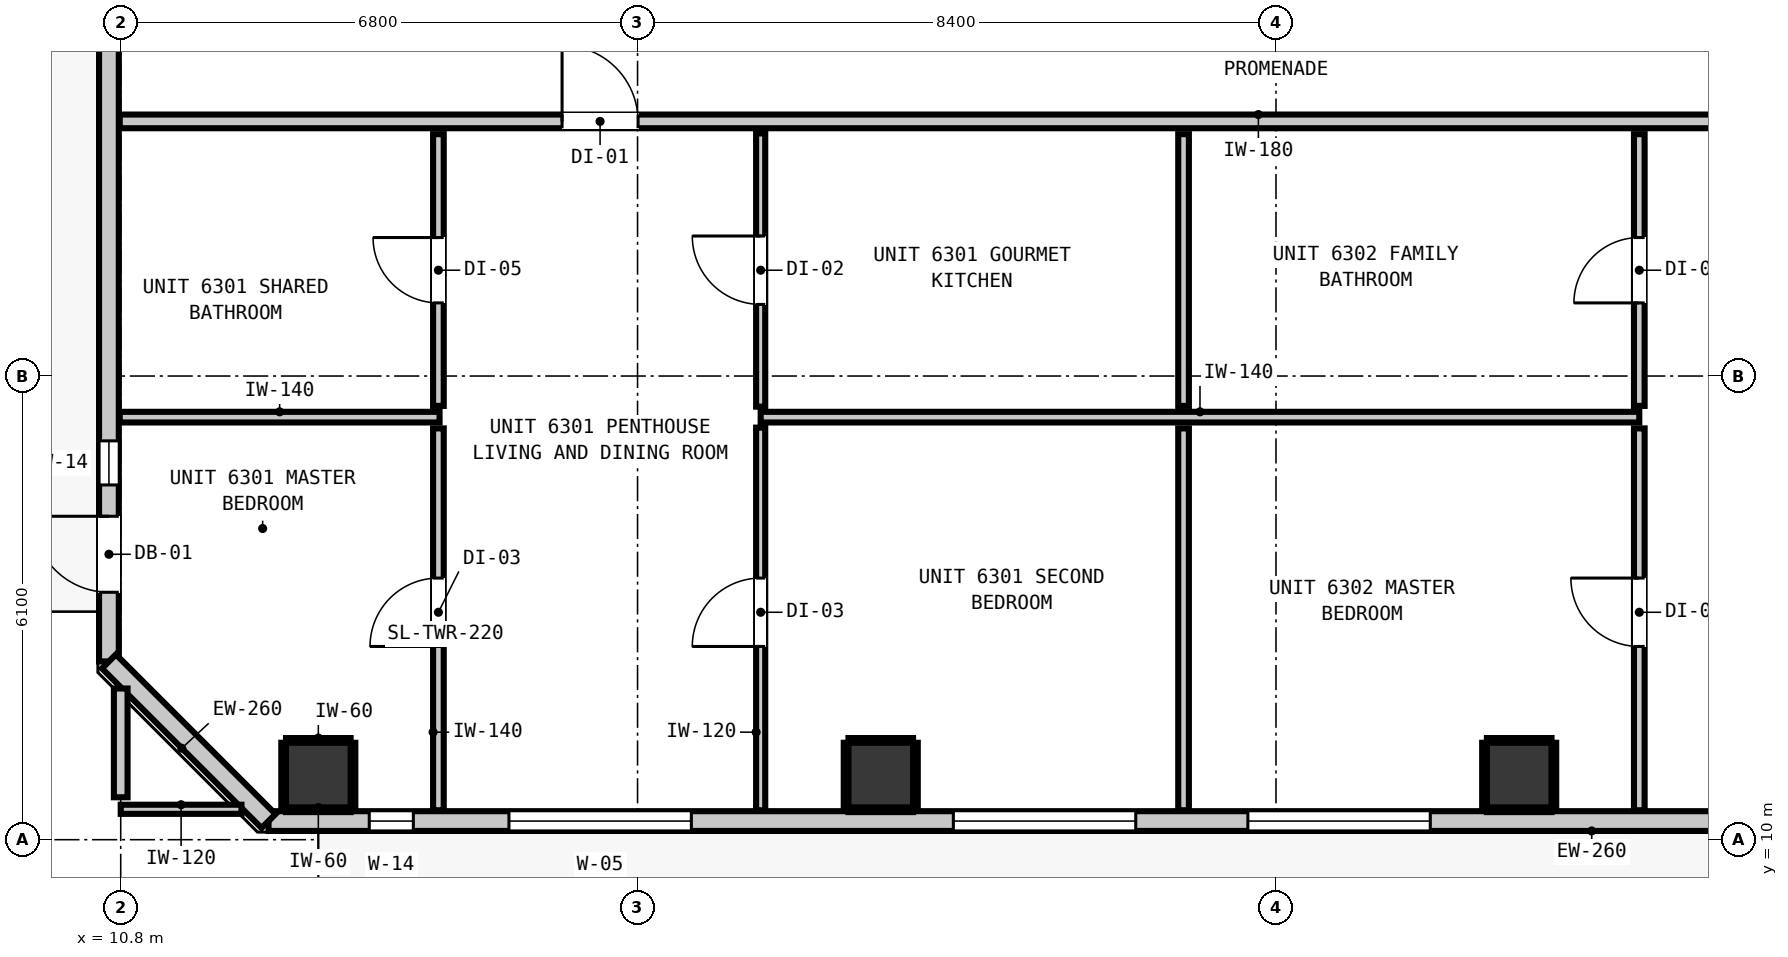
"""IFC4 building model, lengths in metres.
Left out: names, types, materials, properties, quantities, classifications, styles, units other than length and angle.
Written with IfcOpenShell. Run it as: python <this file> out.ifc"""

import sys

from ifc_helpers import new_model, si_unit, direction, frame, frame_2d, origin, origin_2d, place, context, subcontext, project, spatial, rectangle, extrude, element, fill, save


model = new_model("IFC4")
c1 = context("Model", 3, precision=1e-05, world=origin(), true_north=direction((0.0, 1.0)))
c2 = subcontext(c1, "Body", "Model", "MODEL_VIEW")
j1 = project(units=[si_unit("LENGTHUNIT", "METRE"), si_unit("PLANEANGLEUNIT", "RADIAN")], contexts=[c1])
p1 = place(None, origin())
s1 = spatial("IfcSite", under=j1, at=p1, CompositionType="ELEMENT")
p2 = place(p1, origin())
s2 = spatial("IfcBuilding", under=s1, at=p2, CompositionType="ELEMENT")
p3 = place(p2, frame((0.0, 0.0, 216.72)))
s3 = spatial("IfcBuildingStorey", under=s2, at=p3, CompositionType="ELEMENT", Elevation=216.72)
for number, where, z_axis, x_axis in (
    (1, (13.4, 10.85, 0.0), (0.0, 0.0, 1.0), (1.0, 0.0, 0.0)),
    (2, (20.8, 10.85, 0.0), (0.0, 0.0, 1.0), (1.0, 0.0, 0.0)),
    (3, (29.2, 10.85, 0.0), (0.0, 0.0, 1.0), (1.0, 0.0, 0.0)),
):
    element("IfcColumn", number, at=place(p3, frame(where, z_axis=z_axis, x_axis=x_axis)), inside=s3, PredefinedType="COLUMN", context=c2, shape_type="SweptSolid", body=[
        extrude(rectangle(XDim=0.85, YDim=0.85, at=origin_2d()), origin(), (0.0, 0.0, 1.0), 3.32),
    ])
p4 = place(p3, frame((10.645, 12.345, 0.0), z_axis=(0.0, 0.0, 1.0), x_axis=(0.0, 1.0, 0.0)))
e4 = element("IfcWall", 4, at=p4, inside=s3, PredefinedType="STANDARD", context=c2, shape_type="SweptSolid", body=[
    extrude(rectangle(XDim=30.31, YDim=0.26, at=frame_2d((15.155, 0.0))), origin(), (0.0, 0.0, 1.0), 3.1),
])
p5 = place(p4, frame((0.91, 0.0, 0.0)))
e5 = element("IfcOpeningElement", 5, at=p5, cuts=e4, PredefinedType="OPENING", context=c2, shape_type="SweptSolid", body=[
    extrude(rectangle(XDim=1.0, YDim=2.15, at=frame_2d((0.5, 1.075))), frame((0.0, 0.14, 0.0), z_axis=(0.0, -1.0, 0.0), x_axis=(1.0, 0.0, 0.0)), (0.0, 0.0, 1.0), 0.28),
])
p6 = place(p4, frame((2.322, 0.0, 0.85)))
e6 = element("IfcOpeningElement", 6, at=p6, cuts=e4, PredefinedType="OPENING", context=c2, shape_type="SweptSolid", body=[
    extrude(rectangle(XDim=0.58, YDim=1.5, at=frame_2d((0.29, 0.75))), frame((0.0, 0.14, 0.0), z_axis=(0.0, -1.0, 0.0), x_axis=(1.0, 0.0, 0.0)), (0.0, 0.0, 1.0), 0.28),
])
p7 = place(p3, frame((45.455, 10.245, 0.0), z_axis=(0.0, 0.0, 1.0), x_axis=(-1.0, 0.0, 0.0)))
e7 = element("IfcWall", 7, at=p7, inside=s3, PredefinedType="STANDARD", context=c2, shape_type="SweptSolid", body=[
    extrude(rectangle(XDim=32.71, YDim=0.26, at=frame_2d((16.355, 0.0))), origin(), (0.0, 0.0, 1.0), 3.1),
])
p8 = place(p7, frame((2.665, 0.0, 0.0)))
e8 = element("IfcOpeningElement", 8, at=p8, cuts=e7, PredefinedType="OPENING", context=c2, shape_type="SweptSolid", body=[
    extrude(rectangle(XDim=1.0, YDim=2.15, at=frame_2d((0.5, 1.075))), frame((0.0, 0.14, 0.0), z_axis=(0.0, -1.0, 0.0), x_axis=(1.0, 0.0, 0.0)), (0.0, 0.0, 1.0), 0.28),
])
p9 = place(p7, frame((27.147, 0.0, 0.85)))
e9 = element("IfcOpeningElement", 9, at=p9, cuts=e7, PredefinedType="OPENING", context=c2, shape_type="SweptSolid", body=[
    extrude(rectangle(XDim=2.4, YDim=1.95, at=frame_2d((1.2, 0.975))), frame((0.0, 0.14, 0.0), z_axis=(0.0, -1.0, 0.0), x_axis=(1.0, 0.0, 0.0)), (0.0, 0.0, 1.0), 0.28),
])
p10 = place(p7, frame((30.805, 0.0, 0.85)))
e10 = element("IfcOpeningElement", 10, at=p10, cuts=e7, PredefinedType="OPENING", context=c2, shape_type="SweptSolid", body=[
    extrude(rectangle(XDim=0.58, YDim=1.5, at=frame_2d((0.29, 0.75))), frame((0.0, 0.14, 0.0), z_axis=(0.0, -1.0, 0.0), x_axis=(1.0, 0.0, 0.0)), (0.0, 0.0, 1.0), 0.28),
])
p11 = place(p7, frame((21.3, 0.0, 0.85)))
e11 = element("IfcOpeningElement", 11, at=p11, cuts=e7, PredefinedType="OPENING", context=c2, shape_type="SweptSolid", body=[
    extrude(rectangle(XDim=2.4, YDim=1.95, at=frame_2d((1.2, 0.975))), frame((0.0, 0.14, 0.0), z_axis=(0.0, -1.0, 0.0), x_axis=(1.0, 0.0, 0.0)), (0.0, 0.0, 1.0), 0.28),
])
p12 = place(p7, frame((10.777, 0.0, 0.85)))
e12 = element("IfcOpeningElement", 12, at=p12, cuts=e7, PredefinedType="OPENING", context=c2, shape_type="SweptSolid", body=[
    extrude(rectangle(XDim=2.4, YDim=1.95, at=frame_2d((1.2, 0.975))), frame((0.0, 0.14, 0.0), z_axis=(0.0, -1.0, 0.0), x_axis=(1.0, 0.0, 0.0)), (0.0, 0.0, 1.0), 0.28),
])
p13 = place(p7, frame((17.425, 0.0, 0.85)))
e13 = element("IfcOpeningElement", 13, at=p13, cuts=e7, PredefinedType="OPENING", context=c2, shape_type="SweptSolid", body=[
    extrude(rectangle(XDim=2.4, YDim=1.95, at=frame_2d((1.2, 0.975))), frame((0.0, 0.14, 0.0), z_axis=(0.0, -1.0, 0.0), x_axis=(1.0, 0.0, 0.0)), (0.0, 0.0, 1.0), 0.28),
])
p14 = place(p7, frame((4.37, 0.0, 0.85)))
e14 = element("IfcOpeningElement", 14, at=p14, cuts=e7, PredefinedType="OPENING", context=c2, shape_type="SweptSolid", body=[
    extrude(rectangle(XDim=2.4, YDim=1.95, at=frame_2d((1.2, 0.975))), frame((0.0, 0.14, 0.0), z_axis=(0.0, -1.0, 0.0), x_axis=(1.0, 0.0, 0.0)), (0.0, 0.0, 1.0), 0.28),
])
p15 = place(p7, frame((0.548, 0.0, 0.85)))
e15 = element("IfcOpeningElement", 15, at=p15, cuts=e7, PredefinedType="OPENING", context=c2, shape_type="SweptSolid", body=[
    extrude(rectangle(XDim=1.05, YDim=1.65, at=frame_2d((0.525, 0.825))), frame((0.0, 0.14, 0.0), z_axis=(0.0, -1.0, 0.0), x_axis=(1.0, 0.0, 0.0)), (0.0, 0.0, 1.0), 0.28),
])
p16 = place(p3, frame((12.745, 10.245, 0.0), z_axis=(0.0, 0.0, 1.0), x_axis=(-0.707147883682, 0.707065676302, 0.0)))
e16 = element("IfcWall", 16, at=p16, inside=s3, PredefinedType="STANDARD", context=c2, shape_type="SweptSolid", body=[
    extrude(rectangle(XDim=2.97, YDim=0.26, at=frame_2d((1.485, 0.0))), origin(), (0.0, 0.0, 1.0), 3.1),
])
p17 = place(p3, frame((10.787, 19.45, 0.0), z_axis=(0.0, 0.0, 1.0), x_axis=(1.0, 0.0, 0.0)))
e17 = element("IfcWall", 17, at=p17, inside=s3, PredefinedType="PARTITIONING", context=c2, shape_type="SweptSolid", body=[
    extrude(rectangle(XDim=36.626, YDim=0.18, at=frame_2d((18.313, 0.0))), origin(), (0.0, 0.0, 1.0), 3.1),
])
p18 = place(p17, frame((5.82, 0.0, 0.0)))
e18 = element("IfcOpeningElement", 18, at=p18, cuts=e17, PredefinedType="OPENING", context=c2, shape_type="SweptSolid", body=[
    extrude(rectangle(XDim=1.0, YDim=2.15, at=frame_2d((0.5, 1.075))), frame((0.0, 0.1, 0.0), z_axis=(0.0, -1.0, 0.0), x_axis=(1.0, 0.0, 0.0)), (0.0, 0.0, 1.0), 0.2),
])
p19 = place(p17, frame((23.143, 0.0, 0.0)))
e19 = element("IfcOpeningElement", 19, at=p19, cuts=e17, PredefinedType="OPENING", context=c2, shape_type="SweptSolid", body=[
    extrude(rectangle(XDim=1.0, YDim=2.15, at=frame_2d((0.5, 1.075))), frame((0.0, 0.1, 0.0), z_axis=(0.0, -1.0, 0.0), x_axis=(1.0, 0.0, 0.0)), (0.0, 0.0, 1.0), 0.2),
])
p20 = place(p3, frame((10.787, 15.559, 0.0), z_axis=(0.0, 0.0, 1.0), x_axis=(1.0, 0.0, 0.0)))
e20 = element("IfcWall", 20, at=p20, inside=s3, PredefinedType="PARTITIONING", context=c2, shape_type="SweptSolid", body=[
    extrude(rectangle(XDim=4.208, YDim=0.14, at=frame_2d((2.104, 0.0))), origin(), (0.0, 0.0, 1.0), 3.1),
])
p21 = place(p3, frame((19.22, 15.559, 0.0), z_axis=(0.0, 0.0, 1.0), x_axis=(1.0, 0.0, 0.0)))
e21 = element("IfcWall", 21, at=p21, inside=s3, PredefinedType="PARTITIONING", context=c2, shape_type="SweptSolid", body=[
    extrude(rectangle(XDim=11.56, YDim=0.14, at=frame_2d((5.78, 0.0))), origin(), (0.0, 0.0, 1.0), 3.1),
])
p22 = place(p3, frame((10.8, 10.4, 0.0), z_axis=(0.0, 0.0, 1.0), x_axis=(1.0, 0.0, 0.0)))
e22 = element("IfcWall", 22, at=p22, inside=s3, PredefinedType="PARTITIONING", context=c2, shape_type="SweptSolid", body=[
    extrude(rectangle(XDim=1.589, YDim=0.12, at=frame_2d((0.794, 0.0))), origin(), (0.0, 0.0, 1.0), 3.1),
])
p23 = place(p3, frame((10.8, 10.558, 0.0), z_axis=(0.0, 0.0, 1.0), x_axis=(0.0, 1.0, 0.0)))
e23 = element("IfcWall", 23, at=p23, inside=s3, PredefinedType="PARTITIONING", context=c2, shape_type="SweptSolid", body=[
    extrude(rectangle(XDim=1.431, YDim=0.18, at=frame_2d((0.715, 0.0))), origin(), (0.0, 0.0, 1.0), 3.1),
])
p24 = place(p3, frame((14.98, 10.387, 0.0), z_axis=(0.0, 0.0, 1.0), x_axis=(0.0, 1.0, 0.0)))
e24 = element("IfcWall", 24, at=p24, inside=s3, PredefinedType="PARTITIONING", context=c2, shape_type="SweptSolid", body=[
    extrude(rectangle(XDim=5.024, YDim=0.14, at=frame_2d((2.512, 0.0))), origin(), (0.0, 0.0, 1.0), 3.1),
])
p25 = place(p24, frame((2.155, 0.0, 0.0)))
e25 = element("IfcOpeningElement", 25, at=p25, cuts=e24, PredefinedType="OPENING", context=c2, shape_type="SweptSolid", body=[
    extrude(rectangle(XDim=0.9, YDim=2.1, at=frame_2d((0.45, 1.05))), frame((0.0, 0.08, 0.0), z_axis=(0.0, -1.0, 0.0), x_axis=(1.0, 0.0, 0.0)), (0.0, 0.0, 1.0), 0.16),
])
p26 = place(p3, frame((14.98, 15.707, 0.0), z_axis=(0.0, 0.0, 1.0), x_axis=(0.0, 1.0, 0.0)))
e26 = element("IfcWall", 26, at=p26, inside=s3, PredefinedType="PARTITIONING", context=c2, shape_type="SweptSolid", body=[
    extrude(rectangle(XDim=3.575, YDim=0.14, at=frame_2d((1.788, 0.0))), origin(), (0.0, 0.0, 1.0), 3.1),
])
p27 = place(p26, frame((1.355, 0.0, 0.0)))
e27 = element("IfcOpeningElement", 27, at=p27, cuts=e26, PredefinedType="OPENING", context=c2, shape_type="SweptSolid", body=[
    extrude(rectangle(XDim=0.86, YDim=2.02, at=frame_2d((0.43, 1.01))), frame((0.0, 0.08, 0.0), z_axis=(0.0, -1.0, 0.0), x_axis=(1.0, 0.0, 0.0)), (0.0, 0.0, 1.0), 0.16),
])
p28 = place(p3, frame((24.784, 10.387, 0.0), z_axis=(0.0, 0.0, 1.0), x_axis=(0.0, 1.0, 0.0)))
e28 = element("IfcWall", 28, at=p28, inside=s3, PredefinedType="PARTITIONING", context=c2, shape_type="SweptSolid", body=[
    extrude(rectangle(XDim=5.024, YDim=0.14, at=frame_2d((2.512, 0.0))), origin(), (0.0, 0.0, 1.0), 3.1),
])
p29 = place(p3, frame((24.784, 15.707, 0.0), z_axis=(0.0, 0.0, 1.0), x_axis=(0.0, 1.0, 0.0)))
e29 = element("IfcWall", 29, at=p29, inside=s3, PredefinedType="PARTITIONING", context=c2, shape_type="SweptSolid", body=[
    extrude(rectangle(XDim=3.575, YDim=0.14, at=frame_2d((1.788, 0.0))), origin(), (0.0, 0.0, 1.0), 3.1),
])
p30 = place(p3, frame((30.78, 10.387, 0.0), z_axis=(0.0, 0.0, 1.0), x_axis=(0.0, 1.0, 0.0)))
e30 = element("IfcWall", 30, at=p30, inside=s3, PredefinedType="PARTITIONING", context=c2, shape_type="SweptSolid", body=[
    extrude(rectangle(XDim=5.024, YDim=0.14, at=frame_2d((2.512, 0.0))), origin(), (0.0, 0.0, 1.0), 3.1),
])
p31 = place(p30, frame((2.155, 0.0, 0.0)))
e31 = element("IfcOpeningElement", 31, at=p31, cuts=e30, PredefinedType="OPENING", context=c2, shape_type="SweptSolid", body=[
    extrude(rectangle(XDim=0.9, YDim=2.1, at=frame_2d((0.45, 1.05))), frame((0.0, 0.08, 0.0), z_axis=(0.0, -1.0, 0.0), x_axis=(1.0, 0.0, 0.0)), (0.0, 0.0, 1.0), 0.16),
])
p32 = place(p3, frame((30.78, 15.707, 0.0), z_axis=(0.0, 0.0, 1.0), x_axis=(0.0, 1.0, 0.0)))
e32 = element("IfcWall", 32, at=p32, inside=s3, PredefinedType="PARTITIONING", context=c2, shape_type="SweptSolid", body=[
    extrude(rectangle(XDim=3.575, YDim=0.14, at=frame_2d((1.788, 0.0))), origin(), (0.0, 0.0, 1.0), 3.1),
])
p33 = place(p32, frame((1.355, 0.0, 0.0)))
e33 = element("IfcOpeningElement", 33, at=p33, cuts=e32, PredefinedType="OPENING", context=c2, shape_type="SweptSolid", body=[
    extrude(rectangle(XDim=0.86, YDim=2.02, at=frame_2d((0.43, 1.01))), frame((0.0, 0.08, 0.0), z_axis=(0.0, -1.0, 0.0), x_axis=(1.0, 0.0, 0.0)), (0.0, 0.0, 1.0), 0.16),
])
p34 = place(p3, frame((19.22, 10.387, 0.0), z_axis=(0.0, 0.0, 1.0), x_axis=(0.0, 1.0, 0.0)))
e34 = element("IfcWall", 34, at=p34, inside=s3, PredefinedType="PARTITIONING", context=c2, shape_type="SweptSolid", body=[
    extrude(rectangle(XDim=5.034, YDim=0.12, at=frame_2d((2.517, 0.0))), origin(), (0.0, 0.0, 1.0), 3.1),
])
p35 = place(p34, frame((2.155, 0.0, 0.0)))
e35 = element("IfcOpeningElement", 35, at=p35, cuts=e34, PredefinedType="OPENING", context=c2, shape_type="SweptSolid", body=[
    extrude(rectangle(XDim=0.9, YDim=2.1, at=frame_2d((0.45, 1.05))), frame((0.0, 0.07, 0.0), z_axis=(0.0, -1.0, 0.0), x_axis=(1.0, 0.0, 0.0)), (0.0, 0.0, 1.0), 0.14),
])
p36 = place(p3, frame((19.22, 15.697, 0.0), z_axis=(0.0, 0.0, 1.0), x_axis=(0.0, 1.0, 0.0)))
e36 = element("IfcWall", 36, at=p36, inside=s3, PredefinedType="PARTITIONING", context=c2, shape_type="SweptSolid", body=[
    extrude(rectangle(XDim=3.595, YDim=0.12, at=frame_2d((1.797, 0.0))), origin(), (0.0, 0.0, 1.0), 3.1),
])
p37 = place(p36, frame((1.345, 0.0, 0.0)))
e37 = element("IfcOpeningElement", 37, at=p37, cuts=e36, PredefinedType="OPENING", context=c2, shape_type="SweptSolid", body=[
    extrude(rectangle(XDim=0.9, YDim=2.1, at=frame_2d((0.45, 1.05))), frame((0.0, 0.07, 0.0), z_axis=(0.0, -1.0, 0.0), x_axis=(1.0, 0.0, 0.0)), (0.0, 0.0, 1.0), 0.14),
])
for number, where, z_axis, x_axis in (
    (38, (12.975, 10.393, 0.0), (0.0, 0.0, 1.0), (1.0, 0.0, 0.0)),
    (39, (12.975, 11.307, 0.0), (0.0, 0.0, 1.0), (1.0, 0.0, 0.0)),
    (40, (12.943, 10.425, 0.0), (0.0, 0.0, 1.0), (0.0, 1.0, 0.0)),
    (41, (13.857, 10.425, 0.0), (0.0, 0.0, 1.0), (0.0, 1.0, 0.0)),
):
    element("IfcWall", number, at=place(p3, frame(where, z_axis=z_axis, x_axis=x_axis)), inside=s3, PredefinedType="PARTITIONING", context=c2, shape_type="SweptSolid", body=[
        extrude(rectangle(XDim=0.85, YDim=0.06, at=frame_2d((0.425, 0.0))), origin(), (0.0, 0.0, 1.0), 1.45),
    ])
for number, where, z_axis, x_axis in (
    (42, (20.375, 10.393, 0.0), (0.0, 0.0, 1.0), (1.0, 0.0, 0.0)),
    (43, (20.375, 11.307, 0.0), (0.0, 0.0, 1.0), (1.0, 0.0, 0.0)),
):
    element("IfcWall", number, at=place(p3, frame(where, z_axis=z_axis, x_axis=x_axis)), inside=s3, PredefinedType="PARTITIONING", context=c2, shape_type="SweptSolid", body=[
        extrude(rectangle(XDim=0.85, YDim=0.06, at=frame_2d((0.425, 0.0))), origin(), (0.0, 0.0, 1.0), 1.45),
    ])
for number, where, z_axis, x_axis in (
    (44, (20.343, 10.425, 0.0), (0.0, 0.0, 1.0), (0.0, 1.0, 0.0)),
    (45, (21.257, 10.425, 0.0), (0.0, 0.0, 1.0), (0.0, 1.0, 0.0)),
):
    element("IfcWall", number, at=place(p3, frame(where, z_axis=z_axis, x_axis=x_axis)), inside=s3, PredefinedType="PARTITIONING", context=c2, shape_type="SweptSolid", body=[
        extrude(rectangle(XDim=0.85, YDim=0.06, at=frame_2d((0.425, 0.0))), origin(), (0.0, 0.0, 1.0), 1.45),
    ])
for number, where, z_axis, x_axis in (
    (46, (28.775, 10.393, 0.0), (0.0, 0.0, 1.0), (1.0, 0.0, 0.0)),
    (47, (28.775, 11.307, 0.0), (0.0, 0.0, 1.0), (1.0, 0.0, 0.0)),
):
    element("IfcWall", number, at=place(p3, frame(where, z_axis=z_axis, x_axis=x_axis)), inside=s3, PredefinedType="PARTITIONING", context=c2, shape_type="SweptSolid", body=[
        extrude(rectangle(XDim=0.85, YDim=0.06, at=frame_2d((0.425, 0.0))), origin(), (0.0, 0.0, 1.0), 1.45),
    ])
for number, where, z_axis, x_axis in (
    (48, (28.743, 10.425, 0.0), (0.0, 0.0, 1.0), (0.0, 1.0, 0.0)),
    (49, (29.657, 10.425, 0.0), (0.0, 0.0, 1.0), (0.0, 1.0, 0.0)),
):
    element("IfcWall", number, at=place(p3, frame(where, z_axis=z_axis, x_axis=x_axis)), inside=s3, PredefinedType="PARTITIONING", context=c2, shape_type="SweptSolid", body=[
        extrude(rectangle(XDim=0.85, YDim=0.06, at=frame_2d((0.425, 0.0))), origin(), (0.0, 0.0, 1.0), 1.45),
    ])
p38 = place(p5, origin())
e50 = element("IfcDoor", 50, at=p38, inside=s3, OperationType="SINGLE_SWING_RIGHT", PredefinedType="DOOR", context=c2, shape_type="SweptSolid", body=[
    extrude(rectangle(XDim=1.0, YDim=2.15, at=frame_2d((0.5, 1.075))), frame((0.0, 0.025, 0.0), z_axis=(0.0, -1.0, 0.0), x_axis=(1.0, 0.0, 0.0)), (0.0, 0.0, 1.0), 0.05),
])
fill(e5, e50)
p39 = place(p6, origin())
e51 = element("IfcWindow", 51, at=p39, inside=s3, PartitioningType="SINGLE_PANEL", PredefinedType="WINDOW", context=c2, shape_type="SweptSolid", body=[
    extrude(rectangle(XDim=0.58, YDim=1.5, at=frame_2d((0.29, 0.75))), frame((0.0, 0.03, 0.0), z_axis=(0.0, -1.0, 0.0), x_axis=(1.0, 0.0, 0.0)), (0.0, 0.0, 1.0), 0.06),
])
fill(e6, e51)
p40 = place(p9, origin())
e52 = element("IfcWindow", 52, at=p40, inside=s3, PartitioningType="SINGLE_PANEL", PredefinedType="WINDOW", context=c2, shape_type="SweptSolid", body=[
    extrude(rectangle(XDim=2.4, YDim=1.95, at=frame_2d((1.2, 0.975))), frame((0.0, 0.03, 0.0), z_axis=(0.0, -1.0, 0.0), x_axis=(1.0, 0.0, 0.0)), (0.0, 0.0, 1.0), 0.06),
])
fill(e9, e52)
p41 = place(p10, origin())
e53 = element("IfcWindow", 53, at=p41, inside=s3, PartitioningType="SINGLE_PANEL", PredefinedType="WINDOW", context=c2, shape_type="SweptSolid", body=[
    extrude(rectangle(XDim=0.58, YDim=1.5, at=frame_2d((0.29, 0.75))), frame((0.0, 0.03, 0.0), z_axis=(0.0, -1.0, 0.0), x_axis=(1.0, 0.0, 0.0)), (0.0, 0.0, 1.0), 0.06),
])
fill(e10, e53)
p42 = place(p11, origin())
e54 = element("IfcWindow", 54, at=p42, inside=s3, PartitioningType="SINGLE_PANEL", PredefinedType="WINDOW", context=c2, shape_type="SweptSolid", body=[
    extrude(rectangle(XDim=2.4, YDim=1.95, at=frame_2d((1.2, 0.975))), frame((0.0, 0.03, 0.0), z_axis=(0.0, -1.0, 0.0), x_axis=(1.0, 0.0, 0.0)), (0.0, 0.0, 1.0), 0.06),
])
fill(e11, e54)
p43 = place(p13, origin())
e55 = element("IfcWindow", 55, at=p43, inside=s3, PartitioningType="SINGLE_PANEL", PredefinedType="WINDOW", context=c2, shape_type="SweptSolid", body=[
    extrude(rectangle(XDim=2.4, YDim=1.95, at=frame_2d((1.2, 0.975))), frame((0.0, 0.03, 0.0), z_axis=(0.0, -1.0, 0.0), x_axis=(1.0, 0.0, 0.0)), (0.0, 0.0, 1.0), 0.06),
])
fill(e13, e55)
p44 = place(p18, origin())
e56 = element("IfcDoor", 56, at=p44, inside=s3, OperationType="SINGLE_SWING_LEFT", PredefinedType="DOOR", context=c2, shape_type="SweptSolid", body=[
    extrude(rectangle(XDim=1.0, YDim=2.15, at=frame_2d((0.5, 1.075))), frame((0.0, 0.025, 0.0), z_axis=(0.0, -1.0, 0.0), x_axis=(1.0, 0.0, 0.0)), (0.0, 0.0, 1.0), 0.05),
])
fill(e18, e56)
p45 = place(p27, origin())
e57 = element("IfcDoor", 57, at=p45, inside=s3, OperationType="SINGLE_SWING_RIGHT", PredefinedType="DOOR", context=c2, shape_type="SweptSolid", body=[
    extrude(rectangle(XDim=0.86, YDim=2.02, at=frame_2d((0.43, 1.01))), frame((0.0, 0.025, 0.0), z_axis=(0.0, -1.0, 0.0), x_axis=(1.0, 0.0, 0.0)), (0.0, 0.0, 1.0), 0.05),
])
fill(e27, e57)
p46 = place(p25, origin())
e58 = element("IfcDoor", 58, at=p46, inside=s3, OperationType="SINGLE_SWING_LEFT", PredefinedType="DOOR", context=c2, shape_type="SweptSolid", body=[
    extrude(rectangle(XDim=0.9, YDim=2.1, at=frame_2d((0.45, 1.05))), frame((0.0, 0.025, 0.0), z_axis=(0.0, -1.0, 0.0), x_axis=(1.0, 0.0, 0.0)), (0.0, 0.0, 1.0), 0.05),
])
fill(e25, e58)
p47 = place(p37, origin())
e59 = element("IfcDoor", 59, at=p47, inside=s3, OperationType="SINGLE_SWING_RIGHT", PredefinedType="DOOR", context=c2, shape_type="SweptSolid", body=[
    extrude(rectangle(XDim=0.9, YDim=2.1, at=frame_2d((0.45, 1.05))), frame((0.0, 0.025, 0.0), z_axis=(0.0, -1.0, 0.0), x_axis=(1.0, 0.0, 0.0)), (0.0, 0.0, 1.0), 0.05),
])
fill(e37, e59)
p48 = place(p35, origin())
e60 = element("IfcDoor", 60, at=p48, inside=s3, OperationType="SINGLE_SWING_LEFT", PredefinedType="DOOR", context=c2, shape_type="SweptSolid", body=[
    extrude(rectangle(XDim=0.9, YDim=2.1, at=frame_2d((0.45, 1.05))), frame((0.0, 0.025, 0.0), z_axis=(0.0, -1.0, 0.0), x_axis=(1.0, 0.0, 0.0)), (0.0, 0.0, 1.0), 0.05),
])
fill(e35, e60)
p49 = place(p33, origin())
e61 = element("IfcDoor", 61, at=p49, inside=s3, OperationType="SINGLE_SWING_LEFT", PredefinedType="DOOR", context=c2, shape_type="SweptSolid", body=[
    extrude(rectangle(XDim=0.86, YDim=2.02, at=frame_2d((0.43, 1.01))), frame((0.0, 0.025, 0.0), z_axis=(0.0, -1.0, 0.0), x_axis=(1.0, 0.0, 0.0)), (0.0, 0.0, 1.0), 0.05),
])
fill(e33, e61)
p50 = place(p31, origin())
e62 = element("IfcDoor", 62, at=p50, inside=s3, OperationType="SINGLE_SWING_RIGHT", PredefinedType="DOOR", context=c2, shape_type="SweptSolid", body=[
    extrude(rectangle(XDim=0.9, YDim=2.1, at=frame_2d((0.45, 1.05))), frame((0.0, 0.025, 0.0), z_axis=(0.0, -1.0, 0.0), x_axis=(1.0, 0.0, 0.0)), (0.0, 0.0, 1.0), 0.05),
])
fill(e31, e62)
save(model, sys.argv[1])
